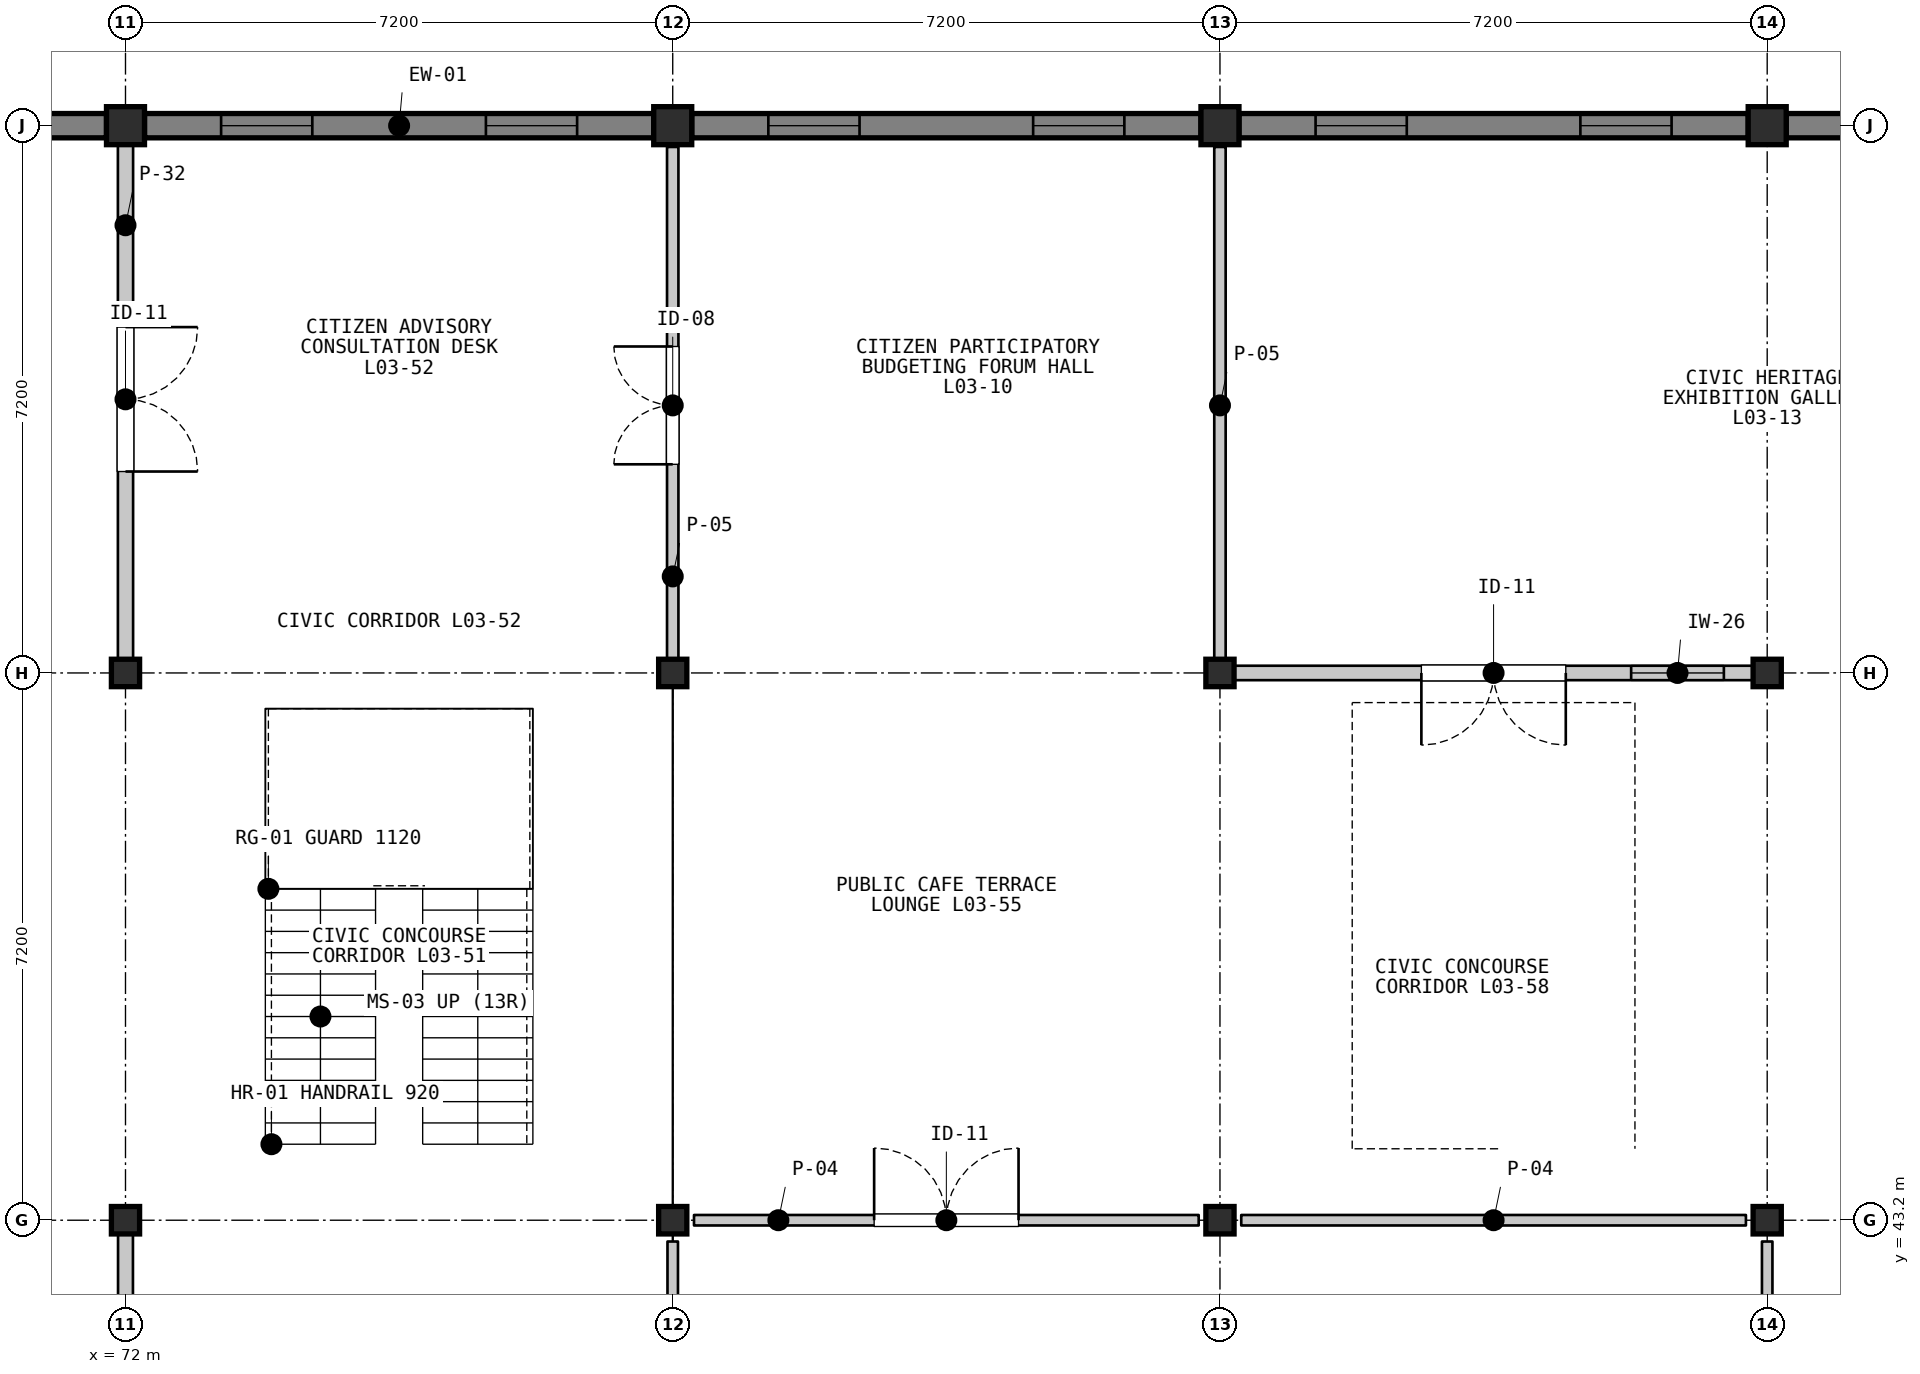
"""IFC4 building model, lengths in metres.
Left out: names, types, materials, properties, quantities, classifications, styles, units other than length and angle.
Written with IfcOpenShell. Run it as: python <this file> out.ifc"""

import sys

from ifc_helpers import new_model, si_unit, direction, frame, frame_2d, origin, origin_2d, place, context, subcontext, project, spatial, rectangle, i_section, extrude, element, fill, save


model = new_model("IFC4")
c1 = context("Model", 3, precision=1e-05, world=origin(), true_north=direction((0.0, 1.0)))
c2 = subcontext(c1, "Body", "Model", "MODEL_VIEW")
j1 = project(units=[si_unit("LENGTHUNIT", "METRE"), si_unit("PLANEANGLEUNIT", "RADIAN")], contexts=[c1])
p1 = place(None, origin())
s1 = spatial("IfcSite", under=j1, at=p1, CompositionType="ELEMENT")
p2 = place(p1, origin())
s2 = spatial("IfcBuilding", under=s1, at=p2, CompositionType="ELEMENT")
p3 = place(p2, frame((0.0, 0.0, 9.9)))
s3 = spatial("IfcBuildingStorey", under=s2, at=p3, CompositionType="ELEMENT", Elevation=9.9)
for number, where, z_axis, x_axis in (
    (1, (72.0, 43.2, 0.0), (0.0, 0.0, 1.0), (1.0, 0.0, 0.0)),
    (2, (72.0, 50.4, 0.0), (0.0, 0.0, 1.0), (1.0, 0.0, 0.0)),
):
    element("IfcColumn", number, at=place(p3, frame(where, z_axis=z_axis, x_axis=x_axis)), inside=s3, PredefinedType="COLUMN", context=c2, shape_type="SweptSolid", body=[
        extrude(i_section(OverallWidth=0.371, OverallDepth=0.361, WebThickness=0.012, FlangeThickness=0.02, FilletRadius=0.015, at=origin_2d()), origin(), (0.0, 0.0, 1.0), 4.2),
    ])
p4 = place(p3, frame((72.0, 57.6, 0.0), z_axis=(0.0, 0.0, 1.0), x_axis=(1.0, 0.0, 0.0)))
e3 = element("IfcColumn", 3, at=p4, inside=s3, PredefinedType="COLUMN", context=c2, shape_type="SweptSolid", body=[
    extrude(rectangle(XDim=0.5, YDim=0.5, at=origin_2d()), origin(), (0.0, 0.0, 1.0), 4.2),
])
for number, where, z_axis, x_axis in (
    (4, (79.2, 43.2, 0.0), (0.0, 0.0, 1.0), (1.0, 0.0, 0.0)),
    (5, (79.2, 50.4, 0.0), (0.0, 0.0, 1.0), (1.0, 0.0, 0.0)),
):
    element("IfcColumn", number, at=place(p3, frame(where, z_axis=z_axis, x_axis=x_axis)), inside=s3, PredefinedType="COLUMN", context=c2, shape_type="SweptSolid", body=[
        extrude(i_section(OverallWidth=0.371, OverallDepth=0.361, WebThickness=0.012, FlangeThickness=0.02, FilletRadius=0.015, at=origin_2d()), origin(), (0.0, 0.0, 1.0), 4.2),
    ])
p5 = place(p3, frame((79.2, 57.6, 0.0), z_axis=(0.0, 0.0, 1.0), x_axis=(1.0, 0.0, 0.0)))
e6 = element("IfcColumn", 6, at=p5, inside=s3, PredefinedType="COLUMN", context=c2, shape_type="SweptSolid", body=[
    extrude(rectangle(XDim=0.5, YDim=0.5, at=origin_2d()), origin(), (0.0, 0.0, 1.0), 4.2),
])
for number, where, z_axis, x_axis in (
    (7, (86.4, 43.2, 0.0), (0.0, 0.0, 1.0), (1.0, 0.0, 0.0)),
    (8, (86.4, 50.4, 0.0), (0.0, 0.0, 1.0), (1.0, 0.0, 0.0)),
):
    element("IfcColumn", number, at=place(p3, frame(where, z_axis=z_axis, x_axis=x_axis)), inside=s3, PredefinedType="COLUMN", context=c2, shape_type="SweptSolid", body=[
        extrude(i_section(OverallWidth=0.371, OverallDepth=0.361, WebThickness=0.012, FlangeThickness=0.02, FilletRadius=0.015, at=origin_2d()), origin(), (0.0, 0.0, 1.0), 4.2),
    ])
p6 = place(p3, frame((86.4, 57.6, 0.0), z_axis=(0.0, 0.0, 1.0), x_axis=(1.0, 0.0, 0.0)))
e9 = element("IfcColumn", 9, at=p6, inside=s3, PredefinedType="COLUMN", context=c2, shape_type="SweptSolid", body=[
    extrude(rectangle(XDim=0.5, YDim=0.5, at=origin_2d()), origin(), (0.0, 0.0, 1.0), 4.2),
])
for number, where, z_axis, x_axis in (
    (10, (93.6, 43.2, 0.0), (0.0, 0.0, 1.0), (1.0, 0.0, 0.0)),
    (11, (93.6, 50.4, 0.0), (0.0, 0.0, 1.0), (1.0, 0.0, 0.0)),
):
    element("IfcColumn", number, at=place(p3, frame(where, z_axis=z_axis, x_axis=x_axis)), inside=s3, PredefinedType="COLUMN", context=c2, shape_type="SweptSolid", body=[
        extrude(i_section(OverallWidth=0.371, OverallDepth=0.361, WebThickness=0.012, FlangeThickness=0.02, FilletRadius=0.015, at=origin_2d()), origin(), (0.0, 0.0, 1.0), 4.2),
    ])
p7 = place(p3, frame((93.6, 57.6, 0.0), z_axis=(0.0, 0.0, 1.0), x_axis=(1.0, 0.0, 0.0)))
e12 = element("IfcColumn", 12, at=p7, inside=s3, PredefinedType="COLUMN", context=c2, shape_type="SweptSolid", body=[
    extrude(rectangle(XDim=0.5, YDim=0.5, at=origin_2d()), origin(), (0.0, 0.0, 1.0), 4.2),
])
p8 = place(p3, frame((65.05, 57.6, 0.0), z_axis=(0.0, 0.0, 1.0), x_axis=(1.0, 0.0, 0.0)))
e13 = element("IfcWall", 13, at=p8, inside=s3, PredefinedType="SOLIDWALL", context=c2, shape_type="SweptSolid", body=[
    extrude(rectangle(XDim=6.7, YDim=0.32, at=frame_2d((3.35, 0.0))), origin(), (0.0, 0.0, 1.0), 3.418),
])
p9 = place(p8, frame((1.008, 0.0, 0.95)))
e14 = element("IfcOpeningElement", 14, at=p9, cuts=e13, PredefinedType="OPENING", context=c2, shape_type="SweptSolid", body=[
    extrude(rectangle(XDim=1.2, YDim=1.7, at=frame_2d((0.6, 0.85))), frame((0.0, 0.17, 0.0), z_axis=(0.0, -1.0, 0.0), x_axis=(1.0, 0.0, 0.0)), (0.0, 0.0, 1.0), 0.34),
])
p10 = place(p8, frame((4.492, 0.0, 0.95)))
e15 = element("IfcOpeningElement", 15, at=p10, cuts=e13, PredefinedType="OPENING", context=c2, shape_type="SweptSolid", body=[
    extrude(rectangle(XDim=1.2, YDim=1.7, at=frame_2d((0.6, 0.85))), frame((0.0, 0.17, 0.0), z_axis=(0.0, -1.0, 0.0), x_axis=(1.0, 0.0, 0.0)), (0.0, 0.0, 1.0), 0.34),
])
p11 = place(p3, frame((72.25, 57.6, 0.0), z_axis=(0.0, 0.0, 1.0), x_axis=(1.0, 0.0, 0.0)))
e16 = element("IfcWall", 16, at=p11, inside=s3, PredefinedType="SOLIDWALL", context=c2, shape_type="SweptSolid", body=[
    extrude(rectangle(XDim=6.7, YDim=0.32, at=frame_2d((3.35, 0.0))), origin(), (0.0, 0.0, 1.0), 3.418),
])
p12 = place(p11, frame((1.008, 0.0, 0.95)))
e17 = element("IfcOpeningElement", 17, at=p12, cuts=e16, PredefinedType="OPENING", context=c2, shape_type="SweptSolid", body=[
    extrude(rectangle(XDim=1.2, YDim=1.7, at=frame_2d((0.6, 0.85))), frame((0.0, 0.17, 0.0), z_axis=(0.0, -1.0, 0.0), x_axis=(1.0, 0.0, 0.0)), (0.0, 0.0, 1.0), 0.34),
])
p13 = place(p11, frame((4.492, 0.0, 0.95)))
e18 = element("IfcOpeningElement", 18, at=p13, cuts=e16, PredefinedType="OPENING", context=c2, shape_type="SweptSolid", body=[
    extrude(rectangle(XDim=1.2, YDim=1.7, at=frame_2d((0.6, 0.85))), frame((0.0, 0.17, 0.0), z_axis=(0.0, -1.0, 0.0), x_axis=(1.0, 0.0, 0.0)), (0.0, 0.0, 1.0), 0.34),
])
p14 = place(p3, frame((79.45, 57.6, 0.0), z_axis=(0.0, 0.0, 1.0), x_axis=(1.0, 0.0, 0.0)))
e19 = element("IfcWall", 19, at=p14, inside=s3, PredefinedType="SOLIDWALL", context=c2, shape_type="SweptSolid", body=[
    extrude(rectangle(XDim=6.7, YDim=0.32, at=frame_2d((3.35, 0.0))), origin(), (0.0, 0.0, 1.0), 3.418),
])
p15 = place(p14, frame((1.008, 0.0, 0.95)))
e20 = element("IfcOpeningElement", 20, at=p15, cuts=e19, PredefinedType="OPENING", context=c2, shape_type="SweptSolid", body=[
    extrude(rectangle(XDim=1.2, YDim=1.7, at=frame_2d((0.6, 0.85))), frame((0.0, 0.17, 0.0), z_axis=(0.0, -1.0, 0.0), x_axis=(1.0, 0.0, 0.0)), (0.0, 0.0, 1.0), 0.34),
])
p16 = place(p14, frame((4.492, 0.0, 0.95)))
e21 = element("IfcOpeningElement", 21, at=p16, cuts=e19, PredefinedType="OPENING", context=c2, shape_type="SweptSolid", body=[
    extrude(rectangle(XDim=1.2, YDim=1.7, at=frame_2d((0.6, 0.85))), frame((0.0, 0.17, 0.0), z_axis=(0.0, -1.0, 0.0), x_axis=(1.0, 0.0, 0.0)), (0.0, 0.0, 1.0), 0.34),
])
p17 = place(p3, frame((86.65, 57.6, 0.0), z_axis=(0.0, 0.0, 1.0), x_axis=(1.0, 0.0, 0.0)))
e22 = element("IfcWall", 22, at=p17, inside=s3, PredefinedType="SOLIDWALL", context=c2, shape_type="SweptSolid", body=[
    extrude(rectangle(XDim=6.7, YDim=0.32, at=frame_2d((3.35, 0.0))), origin(), (0.0, 0.0, 1.0), 3.418),
])
p18 = place(p17, frame((1.008, 0.0, 0.95)))
e23 = element("IfcOpeningElement", 23, at=p18, cuts=e22, PredefinedType="OPENING", context=c2, shape_type="SweptSolid", body=[
    extrude(rectangle(XDim=1.2, YDim=1.7, at=frame_2d((0.6, 0.85))), frame((0.0, 0.17, 0.0), z_axis=(0.0, -1.0, 0.0), x_axis=(1.0, 0.0, 0.0)), (0.0, 0.0, 1.0), 0.34),
])
p19 = place(p17, frame((4.492, 0.0, 0.95)))
e24 = element("IfcOpeningElement", 24, at=p19, cuts=e22, PredefinedType="OPENING", context=c2, shape_type="SweptSolid", body=[
    extrude(rectangle(XDim=1.2, YDim=1.7, at=frame_2d((0.6, 0.85))), frame((0.0, 0.17, 0.0), z_axis=(0.0, -1.0, 0.0), x_axis=(1.0, 0.0, 0.0)), (0.0, 0.0, 1.0), 0.34),
])
p20 = place(p3, frame((93.85, 57.6, 0.0), z_axis=(0.0, 0.0, 1.0), x_axis=(1.0, 0.0, 0.0)))
e25 = element("IfcWall", 25, at=p20, inside=s3, PredefinedType="SOLIDWALL", context=c2, shape_type="SweptSolid", body=[
    extrude(rectangle(XDim=6.7, YDim=0.32, at=frame_2d((3.35, 0.0))), origin(), (0.0, 0.0, 1.0), 3.418),
])
p21 = place(p20, frame((1.008, 0.0, 0.95)))
e26 = element("IfcOpeningElement", 26, at=p21, cuts=e25, PredefinedType="OPENING", context=c2, shape_type="SweptSolid", body=[
    extrude(rectangle(XDim=1.2, YDim=1.7, at=frame_2d((0.6, 0.85))), frame((0.0, 0.17, 0.0), z_axis=(0.0, -1.0, 0.0), x_axis=(1.0, 0.0, 0.0)), (0.0, 0.0, 1.0), 0.34),
])
p22 = place(p20, frame((4.492, 0.0, 0.95)))
e27 = element("IfcOpeningElement", 27, at=p22, cuts=e25, PredefinedType="OPENING", context=c2, shape_type="SweptSolid", body=[
    extrude(rectangle(XDim=1.2, YDim=1.7, at=frame_2d((0.6, 0.85))), frame((0.0, 0.17, 0.0), z_axis=(0.0, -1.0, 0.0), x_axis=(1.0, 0.0, 0.0)), (0.0, 0.0, 1.0), 0.34),
])
p23 = place(p3, frame((72.0, 43.08, 0.0), z_axis=(0.0, 0.0, 1.0), x_axis=(0.0, -1.0, 0.0)))
e28 = element("IfcWall", 28, at=p23, inside=s3, PredefinedType="PARTITIONING", context=c2, shape_type="SweptSolid", body=[
    extrude(rectangle(XDim=6.96, YDim=0.196, at=frame_2d((3.48, 0.0))), origin(), (0.0, 0.0, 1.0), 3.408),
])
p24 = place(p3, frame((72.0, 57.48, 0.0), z_axis=(0.0, 0.0, 1.0), x_axis=(0.0, -1.0, 0.0)))
e29 = element("IfcWall", 29, at=p24, inside=s3, PredefinedType="PARTITIONING", context=c2, shape_type="SweptSolid", body=[
    extrude(rectangle(XDim=6.96, YDim=0.2, at=frame_2d((3.48, 0.0))), origin(), (0.0, 0.0, 1.0), 3.408),
])
p25 = place(p24, frame((2.53, 0.0, 0.0)))
e30 = element("IfcOpeningElement", 30, at=p25, cuts=e29, PredefinedType="OPENING", context=c2, shape_type="SweptSolid", body=[
    extrude(rectangle(XDim=1.9, YDim=2.45, at=frame_2d((0.95, 1.225))), frame((0.0, 0.11, 0.0), z_axis=(0.0, -1.0, 0.0), x_axis=(1.0, 0.0, 0.0)), (0.0, 0.0, 1.0), 0.22),
])
p26 = place(p3, frame((79.48, 43.2, 0.0), z_axis=(0.0, 0.0, 1.0), x_axis=(1.0, 0.0, 0.0)))
e31 = element("IfcWall", 31, at=p26, inside=s3, PredefinedType="PARTITIONING", context=c2, shape_type="SweptSolid", body=[
    extrude(rectangle(XDim=6.64, YDim=0.138, at=frame_2d((3.32, 0.0))), origin(), (0.0, 0.0, 1.0), 3.408),
])
p27 = place(p26, frame((2.37, 0.0, 0.0)))
e32 = element("IfcOpeningElement", 32, at=p27, cuts=e31, PredefinedType="OPENING", context=c2, shape_type="SweptSolid", body=[
    extrude(rectangle(XDim=1.9, YDim=2.45, at=frame_2d((0.95, 1.225))), frame((0.0, 0.079, 0.0), z_axis=(0.0, -1.0, 0.0), x_axis=(1.0, 0.0, 0.0)), (0.0, 0.0, 1.0), 0.158),
])
p28 = place(p3, frame((86.68, 43.2, 0.0), z_axis=(0.0, 0.0, 1.0), x_axis=(1.0, 0.0, 0.0)))
e33 = element("IfcWall", 33, at=p28, inside=s3, PredefinedType="PARTITIONING", context=c2, shape_type="SweptSolid", body=[
    extrude(rectangle(XDim=6.64, YDim=0.138, at=frame_2d((3.32, 0.0))), origin(), (0.0, 0.0, 1.0), 3.408),
])
for number, where, z_axis, x_axis in (
    (34, (79.2, 36.12, 0.0), (0.0, 0.0, 1.0), (0.0, 1.0, 0.0)),
    (35, (93.6, 42.92, 0.0), (0.0, 0.0, 1.0), (0.0, -1.0, 0.0)),
):
    element("IfcWall", number, at=place(p3, frame(where, z_axis=z_axis, x_axis=x_axis)), inside=s3, PredefinedType="PARTITIONING", context=c2, shape_type="SweptSolid", body=[
        extrude(rectangle(XDim=6.8, YDim=0.138, at=frame_2d((3.4, 0.0))), origin(), (0.0, 0.0, 1.0), 3.408),
    ])
p29 = place(p3, frame((79.2, 50.52, 0.0), z_axis=(0.0, 0.0, 1.0), x_axis=(0.0, 1.0, 0.0)))
e36 = element("IfcWall", 36, at=p29, inside=s3, PredefinedType="PARTITIONING", context=c2, shape_type="SweptSolid", body=[
    extrude(rectangle(XDim=6.8, YDim=0.15, at=frame_2d((3.4, 0.0))), origin(), (0.0, 0.0, 1.0), 3.408),
])
p30 = place(p29, frame((2.625, 0.0, 0.0)))
e37 = element("IfcOpeningElement", 37, at=p30, cuts=e36, PredefinedType="OPENING", context=c2, shape_type="SweptSolid", body=[
    extrude(rectangle(XDim=1.55, YDim=2.3, at=frame_2d((0.775, 1.15))), frame((0.0, 0.085, 0.0), z_axis=(0.0, -1.0, 0.0), x_axis=(1.0, 0.0, 0.0)), (0.0, 0.0, 1.0), 0.17),
])
p31 = place(p3, frame((86.4, 57.32, 0.0), z_axis=(0.0, 0.0, 1.0), x_axis=(0.0, -1.0, 0.0)))
e38 = element("IfcWall", 38, at=p31, inside=s3, PredefinedType="PARTITIONING", context=c2, shape_type="SweptSolid", body=[
    extrude(rectangle(XDim=6.8, YDim=0.15, at=frame_2d((3.4, 0.0))), origin(), (0.0, 0.0, 1.0), 3.408),
])
p32 = place(p3, frame((93.48, 50.4, 0.0), z_axis=(0.0, 0.0, 1.0), x_axis=(-1.0, 0.0, 0.0)))
e39 = element("IfcWall", 39, at=p32, inside=s3, PredefinedType="PARTITIONING", context=c2, shape_type="SweptSolid", body=[
    extrude(rectangle(XDim=6.96, YDim=0.19, at=frame_2d((3.48, 0.0))), origin(), (0.0, 0.0, 1.0), 3.408),
])
p33 = place(p32, frame((2.53, 0.0, 0.0)))
e40 = element("IfcOpeningElement", 40, at=p33, cuts=e39, PredefinedType="OPENING", context=c2, shape_type="SweptSolid", body=[
    extrude(rectangle(XDim=1.9, YDim=2.45, at=frame_2d((0.95, 1.225))), frame((0.0, 0.105, 0.0), z_axis=(0.0, -1.0, 0.0), x_axis=(1.0, 0.0, 0.0)), (0.0, 0.0, 1.0), 0.21),
])
p34 = place(p32, frame((0.45, 0.0, 1.05)))
e41 = element("IfcOpeningElement", 41, at=p34, cuts=e39, PredefinedType="OPENING", context=c2, shape_type="SweptSolid", body=[
    extrude(rectangle(XDim=1.22, YDim=0.92, at=frame_2d((0.61, 0.46))), frame((0.0, 0.105, 0.0), z_axis=(0.0, -1.0, 0.0), x_axis=(1.0, 0.0, 0.0)), (0.0, 0.0, 1.0), 0.21),
])
p35 = place(p12, origin())
e42 = element("IfcWindow", 42, at=p35, inside=s3, PartitioningType="SINGLE_PANEL", PredefinedType="WINDOW", context=c2, shape_type="SweptSolid", body=[
    extrude(rectangle(XDim=1.2, YDim=1.7, at=frame_2d((0.6, 0.85))), frame((0.0, 0.03, 0.0), z_axis=(0.0, -1.0, 0.0), x_axis=(1.0, 0.0, 0.0)), (0.0, 0.0, 1.0), 0.06),
])
fill(e17, e42)
p36 = place(p13, origin())
e43 = element("IfcWindow", 43, at=p36, inside=s3, PartitioningType="SINGLE_PANEL", PredefinedType="WINDOW", context=c2, shape_type="SweptSolid", body=[
    extrude(rectangle(XDim=1.2, YDim=1.7, at=frame_2d((0.6, 0.85))), frame((0.0, 0.03, 0.0), z_axis=(0.0, -1.0, 0.0), x_axis=(1.0, 0.0, 0.0)), (0.0, 0.0, 1.0), 0.06),
])
fill(e18, e43)
p37 = place(p15, origin())
e44 = element("IfcWindow", 44, at=p37, inside=s3, PartitioningType="SINGLE_PANEL", PredefinedType="WINDOW", context=c2, shape_type="SweptSolid", body=[
    extrude(rectangle(XDim=1.2, YDim=1.7, at=frame_2d((0.6, 0.85))), frame((0.0, 0.03, 0.0), z_axis=(0.0, -1.0, 0.0), x_axis=(1.0, 0.0, 0.0)), (0.0, 0.0, 1.0), 0.06),
])
fill(e20, e44)
p38 = place(p16, origin())
e45 = element("IfcWindow", 45, at=p38, inside=s3, PartitioningType="SINGLE_PANEL", PredefinedType="WINDOW", context=c2, shape_type="SweptSolid", body=[
    extrude(rectangle(XDim=1.2, YDim=1.7, at=frame_2d((0.6, 0.85))), frame((0.0, 0.03, 0.0), z_axis=(0.0, -1.0, 0.0), x_axis=(1.0, 0.0, 0.0)), (0.0, 0.0, 1.0), 0.06),
])
fill(e21, e45)
p39 = place(p18, origin())
e46 = element("IfcWindow", 46, at=p39, inside=s3, PartitioningType="SINGLE_PANEL", PredefinedType="WINDOW", context=c2, shape_type="SweptSolid", body=[
    extrude(rectangle(XDim=1.2, YDim=1.7, at=frame_2d((0.6, 0.85))), frame((0.0, 0.03, 0.0), z_axis=(0.0, -1.0, 0.0), x_axis=(1.0, 0.0, 0.0)), (0.0, 0.0, 1.0), 0.06),
])
fill(e23, e46)
p40 = place(p19, origin())
e47 = element("IfcWindow", 47, at=p40, inside=s3, PartitioningType="SINGLE_PANEL", PredefinedType="WINDOW", context=c2, shape_type="SweptSolid", body=[
    extrude(rectangle(XDim=1.2, YDim=1.7, at=frame_2d((0.6, 0.85))), frame((0.0, 0.03, 0.0), z_axis=(0.0, -1.0, 0.0), x_axis=(1.0, 0.0, 0.0)), (0.0, 0.0, 1.0), 0.06),
])
fill(e24, e47)
p41 = place(p25, origin())
e48 = element("IfcDoor", 48, at=p41, inside=s3, OperationType="DOUBLE_DOOR_SINGLE_SWING", PredefinedType="DOOR", context=c2, shape_type="SweptSolid", body=[
    extrude(rectangle(XDim=1.9, YDim=2.45, at=frame_2d((0.95, 1.225))), frame((0.0, 0.025, 0.0), z_axis=(0.0, -1.0, 0.0), x_axis=(1.0, 0.0, 0.0)), (0.0, 0.0, 1.0), 0.05),
])
fill(e30, e48)
p42 = place(p27, origin())
e49 = element("IfcDoor", 49, at=p42, inside=s3, OperationType="DOUBLE_DOOR_SINGLE_SWING", PredefinedType="DOOR", context=c2, shape_type="SweptSolid", body=[
    extrude(rectangle(XDim=1.9, YDim=2.45, at=frame_2d((0.95, 1.225))), frame((0.0, 0.025, 0.0), z_axis=(0.0, -1.0, 0.0), x_axis=(1.0, 0.0, 0.0)), (0.0, 0.0, 1.0), 0.05),
])
fill(e32, e49)
p43 = place(p30, origin())
e50 = element("IfcDoor", 50, at=p43, inside=s3, OperationType="DOUBLE_DOOR_SINGLE_SWING", PredefinedType="DOOR", context=c2, shape_type="SweptSolid", body=[
    extrude(rectangle(XDim=1.55, YDim=2.3, at=frame_2d((0.775, 1.15))), frame((0.0, 0.025, 0.0), z_axis=(0.0, -1.0, 0.0), x_axis=(1.0, 0.0, 0.0)), (0.0, 0.0, 1.0), 0.05),
])
fill(e37, e50)
p44 = place(p33, origin())
e51 = element("IfcDoor", 51, at=p44, inside=s3, OperationType="DOUBLE_DOOR_SINGLE_SWING", PredefinedType="DOOR", context=c2, shape_type="SweptSolid", body=[
    extrude(rectangle(XDim=1.9, YDim=2.45, at=frame_2d((0.95, 1.225))), frame((0.0, 0.025, 0.0), z_axis=(0.0, -1.0, 0.0), x_axis=(1.0, 0.0, 0.0)), (0.0, 0.0, 1.0), 0.05),
])
fill(e40, e51)
p45 = place(p34, origin())
e52 = element("IfcWindow", 52, at=p45, inside=s3, PartitioningType="SINGLE_PANEL", PredefinedType="WINDOW", context=c2, shape_type="SweptSolid", body=[
    extrude(rectangle(XDim=1.22, YDim=0.92, at=frame_2d((0.61, 0.46))), frame((0.0, 0.03, 0.0), z_axis=(0.0, -1.0, 0.0), x_axis=(1.0, 0.0, 0.0)), (0.0, 0.0, 1.0), 0.06),
])
fill(e41, e52)
save(model, sys.argv[1])
